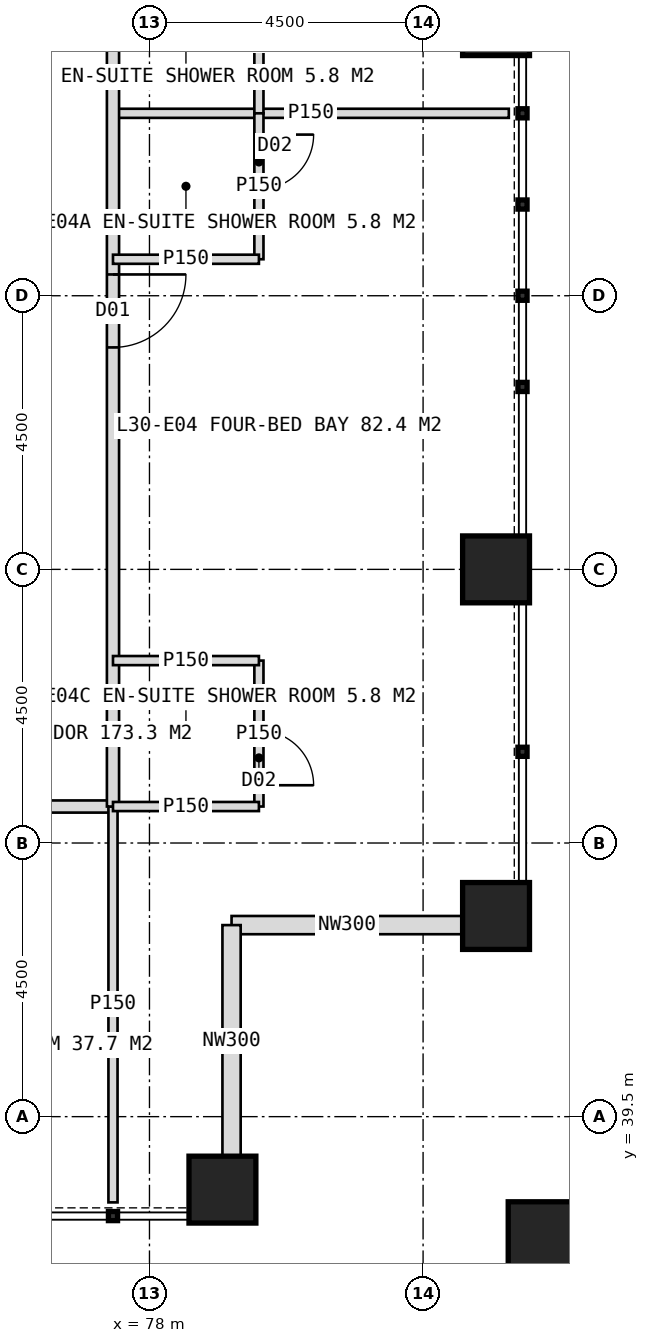
"""IFC4 building model, lengths in metres.
Left out: names, types, materials, properties, quantities, classifications, styles, units other than length and angle.
Written with IfcOpenShell. Run it as: python <this file> out.ifc"""

import sys

from ifc_helpers import new_model, si_unit, direction, frame, frame_2d, origin, origin_2d, place, context, subcontext, project, spatial, rectangle, hollow_rectangle, extrude, element, fill, save


model = new_model("IFC4")
c1 = context("Model", 3, precision=1e-05, world=origin(), true_north=direction((0.0, 1.0)))
c2 = subcontext(c1, "Body", "Model", "MODEL_VIEW")
j1 = project(units=[si_unit("LENGTHUNIT", "METRE"), si_unit("PLANEANGLEUNIT", "RADIAN")], contexts=[c1])
p1 = place(None, origin())
s1 = spatial("IfcSite", under=j1, at=p1, CompositionType="ELEMENT")
p2 = place(p1, origin())
s2 = spatial("IfcBuilding", under=s1, at=p2, CompositionType="ELEMENT")
p3 = place(p2, frame((0.0, 0.0, 128.0)))
s3 = spatial("IfcBuildingStorey", under=s2, at=p3, CompositionType="ELEMENT", Elevation=128.0)
for number, where, z_axis, x_axis in (
    (1, (83.7, 42.8, 0.0), (0.0, 0.0, 1.0), (1.0, 0.0, 0.0)),
    (2, (83.7, 48.5, 0.0), (0.0, 0.0, 1.0), (1.0, 0.0, 0.0)),
    (3, (83.7, 57.5, 0.0), (0.0, 0.0, 1.0), (1.0, 0.0, 0.0)),
    (4, (79.2, 38.3, 0.0), (0.0, 0.0, 1.0), (1.0, 0.0, 0.0)),
):
    element("IfcColumn", number, at=place(p3, frame(where, z_axis=z_axis, x_axis=x_axis)), inside=s3, PredefinedType="COLUMN", context=c2, shape_type="SweptSolid", body=[
        extrude(hollow_rectangle(XDim=1.1, YDim=1.1, WallThickness=0.1, at=origin_2d()), origin(), (0.0, 0.0, 1.0), 4.0),
    ])
p4 = place(p3, frame((84.6, 37.4, 0.0), z_axis=(0.0, 0.0, 1.0), x_axis=(1.0, 0.0, 0.0)))
e5 = element("IfcColumn", 5, at=p4, inside=s3, PredefinedType="COLUMN", context=c2, shape_type="SweptSolid", body=[
    extrude(hollow_rectangle(XDim=1.4, YDim=1.4, WallThickness=0.08, at=origin_2d()), origin(), (0.0, 0.0, 1.0), 4.0),
])
for number, where, z_axis, x_axis in (
    (6, (83.15, 42.65, 0.0), (0.0, 0.0, 1.0), (-1.0, 0.0, 0.0)),
    (7, (79.35, 42.65, 0.0), (0.0, 0.0, 1.0), (0.0, -1.0, 0.0)),
):
    element("IfcWall", number, at=place(p3, frame(where, z_axis=z_axis, x_axis=x_axis)), inside=s3, PredefinedType="ELEMENTEDWALL", context=c2, shape_type="SweptSolid", body=[
        extrude(rectangle(XDim=3.8, YDim=0.3, at=frame_2d((1.9, 0.0))), origin(), (0.0, 0.0, 1.0), 4.0),
    ])
p5 = place(p3, frame((77.4, 44.6, 0.0), z_axis=(0.0, 0.0, 1.0), x_axis=(-1.0, 0.0, 0.0)))
e8 = element("IfcWall", 8, at=p5, inside=s3, PredefinedType="PARTITIONING", context=c2, shape_type="SweptSolid", body=[
    extrude(rectangle(XDim=34.8, YDim=0.2, at=frame_2d((17.4, 0.0))), origin(), (0.0, 0.0, 1.0), 3.75),
])
p6 = place(p5, frame((2.45, 0.0, 0.0)))
e9 = element("IfcOpeningElement", 9, at=p6, cuts=e8, PredefinedType="OPENING", context=c2, shape_type="SweptSolid", body=[
    extrude(rectangle(XDim=1.2, YDim=2.2, at=frame_2d((0.6, 1.1))), frame((0.0, 0.11, 0.0), z_axis=(0.0, -1.0, 0.0), x_axis=(1.0, 0.0, 0.0)), (0.0, 0.0, 1.0), 0.22),
])
p7 = place(p5, frame((10.15, 0.0, 0.0)))
e10 = element("IfcOpeningElement", 10, at=p7, cuts=e8, PredefinedType="OPENING", context=c2, shape_type="SweptSolid", body=[
    extrude(rectangle(XDim=1.2, YDim=2.2, at=frame_2d((0.6, 1.1))), frame((0.0, 0.11, 0.0), z_axis=(0.0, -1.0, 0.0), x_axis=(1.0, 0.0, 0.0)), (0.0, 0.0, 1.0), 0.22),
])
p8 = place(p5, frame((20.45, 0.0, 0.0)))
e11 = element("IfcOpeningElement", 11, at=p8, cuts=e8, PredefinedType="OPENING", context=c2, shape_type="SweptSolid", body=[
    extrude(rectangle(XDim=1.2, YDim=2.2, at=frame_2d((0.6, 1.1))), frame((0.0, 0.11, 0.0), z_axis=(0.0, -1.0, 0.0), x_axis=(1.0, 0.0, 0.0)), (0.0, 0.0, 1.0), 0.22),
])
p9 = place(p5, frame((27.55, 0.0, 0.0)))
e12 = element("IfcOpeningElement", 12, at=p9, cuts=e8, PredefinedType="OPENING", context=c2, shape_type="SweptSolid", body=[
    extrude(rectangle(XDim=1.2, YDim=2.2, at=frame_2d((0.6, 1.1))), frame((0.0, 0.11, 0.0), z_axis=(0.0, -1.0, 0.0), x_axis=(1.0, 0.0, 0.0)), (0.0, 0.0, 1.0), 0.22),
])
for number, where, z_axis, x_axis in (
    (13, (77.4, 44.6, 0.0), (0.0, 0.0, 1.0), (0.0, -1.0, 0.0)),
    (14, (77.4, 56.0, 0.0), (0.0, 0.0, 1.0), (1.0, 0.0, 0.0)),
):
    element("IfcWall", number, at=place(p3, frame(where, z_axis=z_axis, x_axis=x_axis)), inside=s3, PredefinedType="PARTITIONING", context=c2, shape_type="SweptSolid", body=[
        extrude(rectangle(XDim=6.51, YDim=0.15, at=frame_2d((3.255, 0.0))), origin(), (0.0, 0.0, 1.0), 3.75),
    ])
p10 = place(p3, frame((77.4, 79.4, 0.0), z_axis=(0.0, 0.0, 1.0), x_axis=(0.0, -1.0, 0.0)))
e15 = element("IfcWall", 15, at=p10, inside=s3, PredefinedType="PARTITIONING", context=c2, shape_type="SweptSolid", body=[
    extrude(rectangle(XDim=34.8, YDim=0.2, at=frame_2d((17.4, 0.0))), origin(), (0.0, 0.0, 1.0), 3.75),
])
p11 = place(p10, frame((2.45, 0.0, 0.0)))
e16 = element("IfcOpeningElement", 16, at=p11, cuts=e15, PredefinedType="OPENING", context=c2, shape_type="SweptSolid", body=[
    extrude(rectangle(XDim=1.2, YDim=2.2, at=frame_2d((0.6, 1.1))), frame((0.0, 0.11, 0.0), z_axis=(0.0, -1.0, 0.0), x_axis=(1.0, 0.0, 0.0)), (0.0, 0.0, 1.0), 0.22),
])
p12 = place(p10, frame((10.15, 0.0, 0.0)))
e17 = element("IfcOpeningElement", 17, at=p12, cuts=e15, PredefinedType="OPENING", context=c2, shape_type="SweptSolid", body=[
    extrude(rectangle(XDim=1.2, YDim=2.2, at=frame_2d((0.6, 1.1))), frame((0.0, 0.11, 0.0), z_axis=(0.0, -1.0, 0.0), x_axis=(1.0, 0.0, 0.0)), (0.0, 0.0, 1.0), 0.22),
])
p13 = place(p10, frame((19.55, 0.0, 0.0)))
e18 = element("IfcOpeningElement", 18, at=p13, cuts=e15, PredefinedType="OPENING", context=c2, shape_type="SweptSolid", body=[
    extrude(rectangle(XDim=1.2, YDim=2.2, at=frame_2d((0.6, 1.1))), frame((0.0, 0.11, 0.0), z_axis=(0.0, -1.0, 0.0), x_axis=(1.0, 0.0, 0.0)), (0.0, 0.0, 1.0), 0.22),
])
p14 = place(p10, frame((26.05, 0.0, 0.0)))
e19 = element("IfcOpeningElement", 19, at=p14, cuts=e15, PredefinedType="OPENING", context=c2, shape_type="SweptSolid", body=[
    extrude(rectangle(XDim=1.2, YDim=2.2, at=frame_2d((0.6, 1.1))), frame((0.0, 0.11, 0.0), z_axis=(0.0, -1.0, 0.0), x_axis=(1.0, 0.0, 0.0)), (0.0, 0.0, 1.0), 0.22),
])
p15 = place(p3, frame((79.8, 58.4, 0.0), z_axis=(0.0, 0.0, 1.0), x_axis=(0.0, -1.0, 0.0)))
e20 = element("IfcWall", 20, at=p15, inside=s3, PredefinedType="PARTITIONING", context=c2, shape_type="SweptSolid", body=[
    extrude(rectangle(XDim=2.4, YDim=0.15, at=frame_2d((1.2, 0.0))), origin(), (0.0, 0.0, 1.0), 3.75),
])
p16 = place(p15, frame((0.35, 0.0, 0.0)))
e21 = element("IfcOpeningElement", 21, at=p16, cuts=e20, PredefinedType="OPENING", context=c2, shape_type="SweptSolid", body=[
    extrude(rectangle(XDim=0.9, YDim=2.1, at=frame_2d((0.45, 1.05))), frame((0.0, 0.085, 0.0), z_axis=(0.0, -1.0, 0.0), x_axis=(1.0, 0.0, 0.0)), (0.0, 0.0, 1.0), 0.17),
])
p17 = place(p3, frame((79.8, 56.0, 0.0), z_axis=(0.0, 0.0, 1.0), x_axis=(0.0, -1.0, 0.0)))
e22 = element("IfcWall", 22, at=p17, inside=s3, PredefinedType="PARTITIONING", context=c2, shape_type="SweptSolid", body=[
    extrude(rectangle(XDim=2.4, YDim=0.15, at=frame_2d((1.2, 0.0))), origin(), (0.0, 0.0, 1.0), 3.75),
])
p18 = place(p17, frame((0.35, 0.0, 0.0)))
e23 = element("IfcOpeningElement", 23, at=p18, cuts=e22, PredefinedType="OPENING", context=c2, shape_type="SweptSolid", body=[
    extrude(rectangle(XDim=0.9, YDim=2.1, at=frame_2d((0.45, 1.05))), frame((0.0, 0.085, 0.0), z_axis=(0.0, -1.0, 0.0), x_axis=(1.0, 0.0, 0.0)), (0.0, 0.0, 1.0), 0.17),
])
p19 = place(p3, frame((77.4, 53.6, 0.0), z_axis=(0.0, 0.0, 1.0), x_axis=(1.0, 0.0, 0.0)))
e24 = element("IfcWall", 24, at=p19, inside=s3, PredefinedType="PARTITIONING", context=c2, shape_type="SweptSolid", body=[
    extrude(rectangle(XDim=2.4, YDim=0.15, at=frame_2d((1.2, 0.0))), origin(), (0.0, 0.0, 1.0), 3.75),
])
p20 = place(p3, frame((79.8, 47.0, 0.0), z_axis=(0.0, 0.0, 1.0), x_axis=(0.0, -1.0, 0.0)))
e25 = element("IfcWall", 25, at=p20, inside=s3, PredefinedType="PARTITIONING", context=c2, shape_type="SweptSolid", body=[
    extrude(rectangle(XDim=2.4, YDim=0.15, at=frame_2d((1.2, 0.0))), origin(), (0.0, 0.0, 1.0), 3.75),
])
p21 = place(p20, frame((1.15, 0.0, 0.0)))
e26 = element("IfcOpeningElement", 26, at=p21, cuts=e25, PredefinedType="OPENING", context=c2, shape_type="SweptSolid", body=[
    extrude(rectangle(XDim=0.9, YDim=2.1, at=frame_2d((0.45, 1.05))), frame((0.0, 0.085, 0.0), z_axis=(0.0, -1.0, 0.0), x_axis=(1.0, 0.0, 0.0)), (0.0, 0.0, 1.0), 0.17),
])
for number, where, z_axis, x_axis in (
    (27, (77.4, 47.0, 0.0), (0.0, 0.0, 1.0), (1.0, 0.0, 0.0)),
    (28, (77.4, 44.6, 0.0), (0.0, 0.0, 1.0), (1.0, 0.0, 0.0)),
):
    element("IfcWall", number, at=place(p3, frame(where, z_axis=z_axis, x_axis=x_axis)), inside=s3, PredefinedType="PARTITIONING", context=c2, shape_type="SweptSolid", body=[
        extrude(rectangle(XDim=2.4, YDim=0.15, at=frame_2d((1.2, 0.0))), origin(), (0.0, 0.0, 1.0), 3.75),
    ])
p22 = place(p14, origin())
e29 = element("IfcDoor", 29, at=p22, inside=s3, OperationType="SINGLE_SWING_LEFT", PredefinedType="DOOR", context=c2, shape_type="SweptSolid", body=[
    extrude(rectangle(XDim=1.2, YDim=2.2, at=frame_2d((0.6, 1.1))), frame((0.0, 0.025, 0.0), z_axis=(0.0, -1.0, 0.0), x_axis=(1.0, 0.0, 0.0)), (0.0, 0.0, 1.0), 0.05),
])
fill(e19, e29)
p23 = place(p18, origin())
e30 = element("IfcDoor", 30, at=p23, inside=s3, OperationType="SINGLE_SWING_LEFT", PredefinedType="DOOR", context=c2, shape_type="SweptSolid", body=[
    extrude(rectangle(XDim=0.9, YDim=2.1, at=frame_2d((0.45, 1.05))), frame((0.0, 0.025, 0.0), z_axis=(0.0, -1.0, 0.0), x_axis=(1.0, 0.0, 0.0)), (0.0, 0.0, 1.0), 0.05),
])
fill(e23, e30)
p24 = place(p21, origin())
e31 = element("IfcDoor", 31, at=p24, inside=s3, OperationType="SINGLE_SWING_RIGHT", PredefinedType="DOOR", context=c2, shape_type="SweptSolid", body=[
    extrude(rectangle(XDim=0.9, YDim=2.1, at=frame_2d((0.45, 1.05))), frame((0.0, 0.025, 0.0), z_axis=(0.0, -1.0, 0.0), x_axis=(1.0, 0.0, 0.0)), (0.0, 0.0, 1.0), 0.05),
])
fill(e26, e31)
save(model, sys.argv[1])
